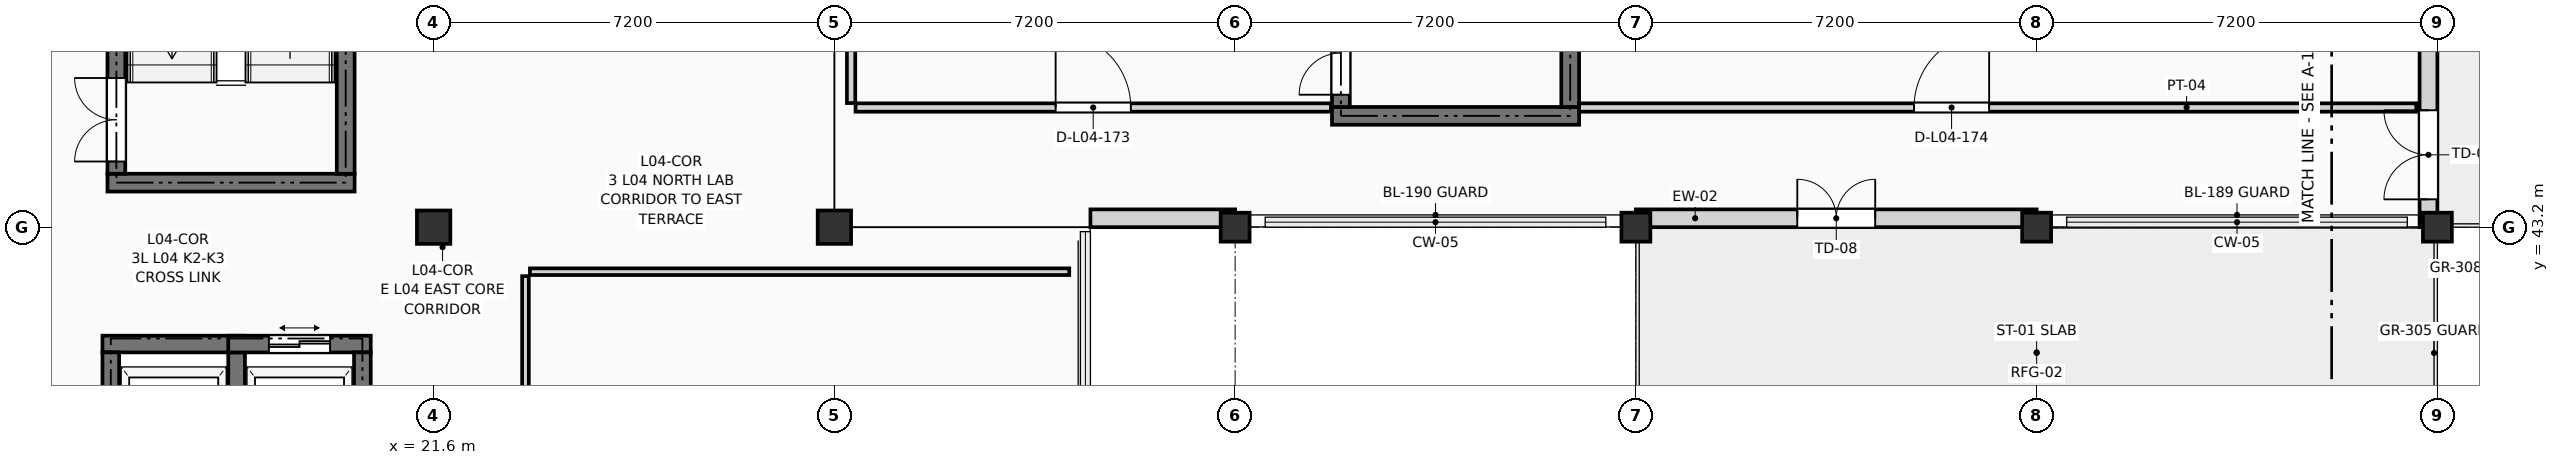
"""IFC4 building model, lengths in metres.
Left out: names, types, materials, properties, quantities, classifications, styles, units other than length and angle.
Written with IfcOpenShell. Run it as: python <this file> out.ifc"""

import sys

from ifc_helpers import new_model, si_unit, direction, frame, frame_2d, origin, origin_2d, place, context, subcontext, project, spatial, rectangle, extrude, element, fill, save


model = new_model("IFC4")
c1 = context("Model", 3, precision=1e-05, world=origin(), true_north=direction((0.0, 1.0)))
c2 = subcontext(c1, "Body", "Model", "MODEL_VIEW")
j1 = project(units=[si_unit("LENGTHUNIT", "METRE"), si_unit("PLANEANGLEUNIT", "RADIAN")], contexts=[c1])
p1 = place(None, origin())
s1 = spatial("IfcSite", under=j1, at=p1, CompositionType="ELEMENT")
p2 = place(p1, origin())
s2 = spatial("IfcBuilding", under=s1, at=p2, CompositionType="ELEMENT")
p3 = place(p2, frame((0.0, 0.0, 15.75)))
s3 = spatial("IfcBuildingStorey", under=s2, at=p3, CompositionType="ELEMENT", Elevation=15.75)
for number, where, z_axis, x_axis in (
    (1, (21.6, 43.2, 0.0), (0.0, 0.0, 1.0), (1.0, 0.0, 0.0)),
    (2, (28.8, 43.2, 0.0), (0.0, 0.0, 1.0), (1.0, 0.0, 0.0)),
):
    element("IfcColumn", number, at=place(p3, frame(where, z_axis=z_axis, x_axis=x_axis)), inside=s3, PredefinedType="COLUMN", context=c2, shape_type="SweptSolid", body=[
        extrude(rectangle(XDim=0.6, YDim=0.6, at=origin_2d()), origin(), (0.0, 0.0, 1.0), 3.6),
    ])
for number, where, z_axis, x_axis in (
    (3, (36.0, 43.2, 0.0), (0.0, 0.0, 1.0), (1.0, 0.0, 0.0)),
    (4, (43.2, 43.2, 0.0), (0.0, 0.0, 1.0), (1.0, 0.0, 0.0)),
    (5, (50.4, 43.2, 0.0), (0.0, 0.0, 1.0), (1.0, 0.0, 0.0)),
    (6, (57.6, 43.2, 0.0), (0.0, 0.0, 1.0), (1.0, 0.0, 0.0)),
):
    element("IfcColumn", number, at=place(p3, frame(where, z_axis=z_axis, x_axis=x_axis)), inside=s3, PredefinedType="COLUMN", context=c2, shape_type="SweptSolid", body=[
        extrude(rectangle(XDim=0.52, YDim=0.52, at=origin_2d()), origin(), (0.0, 0.0, 1.0), 3.6),
    ])
p4 = place(p3, frame((57.44, 43.2, 0.0), z_axis=(0.0, 0.0, 1.0), x_axis=(0.0, 1.0, 0.0)))
e7 = element("IfcWall", 7, at=p4, inside=s3, PredefinedType="SOLIDWALL", context=c2, shape_type="SweptSolid", body=[
    extrude(rectangle(XDim=6.0, YDim=0.32, at=frame_2d((3.0, 0.0))), origin(), (0.0, 0.0, 1.0), 2.84),
])
p5 = place(p4, frame((0.5, 0.0, 0.0)))
e8 = element("IfcOpeningElement", 8, at=p5, cuts=e7, PredefinedType="OPENING", context=c2, shape_type="SweptSolid", body=[
    extrude(rectangle(XDim=1.6, YDim=2.25, at=frame_2d((0.8, 1.125))), frame((0.0, 0.172, 0.0), z_axis=(0.0, -1.0, 0.0), x_axis=(1.0, 0.0, 0.0)), (0.0, 0.0, 1.0), 0.344),
])
p6 = place(p3, frame((43.2, 43.36, 0.0), z_axis=(0.0, 0.0, 1.0), x_axis=(1.0, 0.0, 0.0)))
e9 = element("IfcWall", 9, at=p6, inside=s3, PredefinedType="SOLIDWALL", context=c2, shape_type="SweptSolid", body=[
    extrude(rectangle(XDim=7.2, YDim=0.32, at=frame_2d((3.6, 0.0))), origin(), (0.0, 0.0, 1.0), 2.84),
])
p7 = place(p6, frame((2.9, 0.0, 0.0)))
e10 = element("IfcOpeningElement", 10, at=p7, cuts=e9, PredefinedType="OPENING", context=c2, shape_type="SweptSolid", body=[
    extrude(rectangle(XDim=1.4, YDim=2.2, at=frame_2d((0.7, 1.1))), frame((0.0, 0.172, 0.0), z_axis=(0.0, -1.0, 0.0), x_axis=(1.0, 0.0, 0.0)), (0.0, 0.0, 1.0), 0.344),
])
p8 = place(p3, frame((33.4, 43.36, 0.0), z_axis=(0.0, 0.0, 1.0), x_axis=(1.0, 0.0, 0.0)))
e11 = element("IfcWall", 11, at=p8, inside=s3, PredefinedType="SOLIDWALL", context=c2, shape_type="SweptSolid", body=[
    extrude(rectangle(XDim=2.6, YDim=0.32, at=frame_2d((1.3, 0.0))), origin(), (0.0, 0.0, 1.0), 3.38),
])
p9 = place(p3, frame((15.74, 44.0, 0.0), z_axis=(0.0, 0.0, 1.0), x_axis=(1.0, 0.0, 0.0)))
e12 = element("IfcWall", 12, at=p9, inside=s3, PredefinedType="SHEAR", context=c2, shape_type="SweptSolid", body=[
    extrude(rectangle(XDim=4.44, YDim=0.32, at=frame_2d((2.22, 0.0))), origin(), (0.0, 0.0, 1.0), 3.39),
])
p10 = place(p3, frame((15.9, 44.16, 0.0), z_axis=(0.0, 0.0, 1.0), x_axis=(0.0, 1.0, 0.0)))
e13 = element("IfcWall", 13, at=p10, inside=s3, PredefinedType="SHEAR", context=c2, shape_type="SweptSolid", body=[
    extrude(rectangle(XDim=7.28, YDim=0.32, at=frame_2d((3.64, 0.0))), origin(), (0.0, 0.0, 1.0), 3.39),
])
p11 = place(p10, frame((0.22, 0.0, 0.0)))
e14 = element("IfcOpeningElement", 14, at=p11, cuts=e13, PredefinedType="OPENING", context=c2, shape_type="SweptSolid", body=[
    extrude(rectangle(XDim=1.5, YDim=2.2, at=frame_2d((0.75, 1.1))), frame((0.0, 0.172, 0.0), z_axis=(0.0, -1.0, 0.0), x_axis=(1.0, 0.0, 0.0)), (0.0, 0.0, 1.0), 0.344),
])
p12 = place(p3, frame((20.02, 44.16, 0.0), z_axis=(0.0, 0.0, 1.0), x_axis=(0.0, 1.0, 0.0)))
e15 = element("IfcWall", 15, at=p12, inside=s3, PredefinedType="SHEAR", context=c2, shape_type="SweptSolid", body=[
    extrude(rectangle(XDim=7.28, YDim=0.32, at=frame_2d((3.64, 0.0))), origin(), (0.0, 0.0, 1.0), 3.39),
])
p13 = place(p3, frame((37.74, 45.2, 0.0), z_axis=(0.0, 0.0, 1.0), x_axis=(1.0, 0.0, 0.0)))
e16 = element("IfcWall", 16, at=p13, inside=s3, PredefinedType="SHEAR", context=c2, shape_type="SweptSolid", body=[
    extrude(rectangle(XDim=4.44, YDim=0.32, at=frame_2d((2.22, 0.0))), origin(), (0.0, 0.0, 1.0), 3.39),
])
p14 = place(p3, frame((37.9, 45.36, 0.0), z_axis=(0.0, 0.0, 1.0), x_axis=(0.0, 1.0, 0.0)))
e17 = element("IfcWall", 17, at=p14, inside=s3, PredefinedType="SHEAR", context=c2, shape_type="SweptSolid", body=[
    extrude(rectangle(XDim=7.28, YDim=0.32, at=frame_2d((3.64, 0.0))), origin(), (0.0, 0.0, 1.0), 3.39),
])
p15 = place(p14, frame((0.22, 0.0, 0.0)))
e18 = element("IfcOpeningElement", 18, at=p15, cuts=e17, PredefinedType="OPENING", context=c2, shape_type="SweptSolid", body=[
    extrude(rectangle(XDim=1.5, YDim=2.2, at=frame_2d((0.75, 1.1))), frame((0.0, 0.172, 0.0), z_axis=(0.0, -1.0, 0.0), x_axis=(1.0, 0.0, 0.0)), (0.0, 0.0, 1.0), 0.344),
])
p16 = place(p3, frame((42.02, 45.36, 0.0), z_axis=(0.0, 0.0, 1.0), x_axis=(0.0, 1.0, 0.0)))
e19 = element("IfcWall", 19, at=p16, inside=s3, PredefinedType="SHEAR", context=c2, shape_type="SweptSolid", body=[
    extrude(rectangle(XDim=7.28, YDim=0.32, at=frame_2d((3.64, 0.0))), origin(), (0.0, 0.0, 1.0), 3.39),
])
p17 = place(p3, frame((15.65, 41.1, 0.0), z_axis=(0.0, 0.0, 1.0), x_axis=(1.0, 0.0, 0.0)))
e20 = element("IfcWall", 20, at=p17, inside=s3, PredefinedType="SHEAR", context=c2, shape_type="SweptSolid", body=[
    extrude(rectangle(XDim=2.56, YDim=0.3, at=frame_2d((1.28, 0.0))), origin(), (0.0, 0.0, 1.0), 3.39),
])
p18 = place(p3, frame((15.8, 37.98, 0.0), z_axis=(0.0, 0.0, 1.0), x_axis=(0.0, 1.0, 0.0)))
e21 = element("IfcWall", 21, at=p18, inside=s3, PredefinedType="SHEAR", context=c2, shape_type="SweptSolid", body=[
    extrude(rectangle(XDim=2.97, YDim=0.3, at=frame_2d((1.485, 0.0))), origin(), (0.0, 0.0, 1.0), 3.39),
])
p19 = place(p18, frame((0.935, 0.0, 0.0)))
e22 = element("IfcOpeningElement", 22, at=p19, cuts=e21, PredefinedType="OPENING", context=c2, shape_type="SweptSolid", body=[
    extrude(rectangle(XDim=1.1, YDim=2.2, at=frame_2d((0.55, 1.1))), frame((0.0, 0.162, 0.0), z_axis=(0.0, -1.0, 0.0), x_axis=(1.0, 0.0, 0.0)), (0.0, 0.0, 1.0), 0.324),
])
p20 = place(p3, frame((18.06, 37.98, 0.0), z_axis=(0.0, 0.0, 1.0), x_axis=(0.0, 1.0, 0.0)))
e23 = element("IfcWall", 23, at=p20, inside=s3, PredefinedType="SHEAR", context=c2, shape_type="SweptSolid", body=[
    extrude(rectangle(XDim=2.97, YDim=0.3, at=frame_2d((1.485, 0.0))), origin(), (0.0, 0.0, 1.0), 3.39),
])
p21 = place(p3, frame((17.91, 41.1, 0.0), z_axis=(0.0, 0.0, 1.0), x_axis=(1.0, 0.0, 0.0)))
e24 = element("IfcWall", 24, at=p21, inside=s3, PredefinedType="SHEAR", context=c2, shape_type="SweptSolid", body=[
    extrude(rectangle(XDim=2.56, YDim=0.3, at=frame_2d((1.28, 0.0))), origin(), (0.0, 0.0, 1.0), 3.39),
])
p22 = place(p21, frame((0.73, 0.0, 0.0)))
e25 = element("IfcOpeningElement", 25, at=p22, cuts=e24, PredefinedType="OPENING", context=c2, shape_type="SweptSolid", body=[
    extrude(rectangle(XDim=1.1, YDim=2.2, at=frame_2d((0.55, 1.1))), frame((0.0, 0.162, 0.0), z_axis=(0.0, -1.0, 0.0), x_axis=(1.0, 0.0, 0.0)), (0.0, 0.0, 1.0), 0.324),
])
p23 = place(p3, frame((20.32, 37.98, 0.0), z_axis=(0.0, 0.0, 1.0), x_axis=(0.0, 1.0, 0.0)))
e26 = element("IfcWall", 26, at=p23, inside=s3, PredefinedType="SHEAR", context=c2, shape_type="SweptSolid", body=[
    extrude(rectangle(XDim=2.97, YDim=0.3, at=frame_2d((1.485, 0.0))), origin(), (0.0, 0.0, 1.0), 3.39),
])
p24 = place(p3, frame((23.25, 31.68, 0.0), z_axis=(0.0, 0.0, 1.0), x_axis=(0.0, 1.0, 0.0)))
e27 = element("IfcWall", 27, at=p24, inside=s3, PredefinedType="PARTITIONING", context=c2, shape_type="SweptSolid", body=[
    extrude(rectangle(XDim=10.64, YDim=0.12, at=frame_2d((5.32, 0.0))), origin(), (0.0, 0.0, 1.0), 3.375),
])
p25 = place(p24, frame((5.77, 0.0, 0.0)))
e28 = element("IfcOpeningElement", 28, at=p25, cuts=e27, PredefinedType="OPENING", context=c2, shape_type="SweptSolid", body=[
    extrude(rectangle(XDim=1.32, YDim=2.2, at=frame_2d((0.66, 1.1))), frame((0.0, 0.072, 0.0), z_axis=(0.0, -1.0, 0.0), x_axis=(1.0, 0.0, 0.0)), (0.0, 0.0, 1.0), 0.144),
])
p26 = place(p3, frame((23.33, 42.4, 0.0), z_axis=(0.0, 0.0, 1.0), x_axis=(1.0, 0.0, 0.0)))
e29 = element("IfcWall", 29, at=p26, inside=s3, PredefinedType="PARTITIONING", context=c2, shape_type="SweptSolid", body=[
    extrude(rectangle(XDim=9.69, YDim=0.12, at=frame_2d((4.845, 0.0))), origin(), (0.0, 0.0, 1.0), 3.375),
])
p27 = place(p3, frame((29.1, 45.43, 0.0), z_axis=(0.0, 0.0, 1.0), x_axis=(0.0, 1.0, 0.0)))
e30 = element("IfcWall", 30, at=p27, inside=s3, PredefinedType="PARTITIONING", context=c2, shape_type="SweptSolid", body=[
    extrude(rectangle(XDim=10.49, YDim=0.15, at=frame_2d((5.245, 0.0))), origin(), (0.0, 0.0, 1.0), 2.655),
])
p28 = place(p3, frame((29.18, 45.35, 0.0), z_axis=(0.0, 0.0, 1.0), x_axis=(1.0, 0.0, 0.0)))
e31 = element("IfcWall", 31, at=p28, inside=s3, PredefinedType="PARTITIONING", context=c2, shape_type="SweptSolid", body=[
    extrude(rectangle(XDim=8.54, YDim=0.15, at=frame_2d((4.27, 0.0))), origin(), (0.0, 0.0, 1.0), 3.375),
])
p29 = place(p28, frame((3.595, 0.0, 0.0)))
e32 = element("IfcOpeningElement", 32, at=p29, cuts=e31, PredefinedType="OPENING", context=c2, shape_type="SweptSolid", body=[
    extrude(rectangle(XDim=1.35, YDim=2.2, at=frame_2d((0.675, 1.1))), frame((0.0, 0.087, 0.0), z_axis=(0.0, -1.0, 0.0), x_axis=(1.0, 0.0, 0.0)), (0.0, 0.0, 1.0), 0.174),
])
p30 = place(p3, frame((42.18, 45.35, 0.0), z_axis=(0.0, 0.0, 1.0), x_axis=(1.0, 0.0, 0.0)))
e33 = element("IfcWall", 33, at=p30, inside=s3, PredefinedType="PARTITIONING", context=c2, shape_type="SweptSolid", body=[
    extrude(rectangle(XDim=15.04, YDim=0.15, at=frame_2d((7.52, 0.0))), origin(), (0.0, 0.0, 1.0), 3.375),
])
p31 = place(p30, frame((6.017, 0.0, 0.0)))
e34 = element("IfcOpeningElement", 34, at=p31, cuts=e33, PredefinedType="OPENING", context=c2, shape_type="SweptSolid", body=[
    extrude(rectangle(XDim=1.35, YDim=2.2, at=frame_2d((0.675, 1.1))), frame((0.0, 0.087, 0.0), z_axis=(0.0, -1.0, 0.0), x_axis=(1.0, 0.0, 0.0)), (0.0, 0.0, 1.0), 0.174),
])
p32 = place(p5, origin())
e35 = element("IfcDoor", 35, at=p32, inside=s3, OperationType="DOUBLE_DOOR_SINGLE_SWING", PredefinedType="DOOR", context=c2, shape_type="SweptSolid", body=[
    extrude(rectangle(XDim=1.6, YDim=2.25, at=frame_2d((0.8, 1.125))), frame((0.0, 0.025, 0.0), z_axis=(0.0, -1.0, 0.0), x_axis=(1.0, 0.0, 0.0)), (0.0, 0.0, 1.0), 0.05),
])
fill(e8, e35)
p33 = place(p7, origin())
e36 = element("IfcDoor", 36, at=p33, inside=s3, OperationType="DOUBLE_DOOR_SINGLE_SWING", PredefinedType="DOOR", context=c2, shape_type="SweptSolid", body=[
    extrude(rectangle(XDim=1.4, YDim=2.2, at=frame_2d((0.7, 1.1))), frame((0.0, 0.025, 0.0), z_axis=(0.0, -1.0, 0.0), x_axis=(1.0, 0.0, 0.0)), (0.0, 0.0, 1.0), 0.05),
])
fill(e10, e36)
p34 = place(p11, origin())
e37 = element("IfcDoor", 37, at=p34, inside=s3, OperationType="DOUBLE_DOOR_SINGLE_SWING", PredefinedType="DOOR", context=c2, shape_type="SweptSolid", body=[
    extrude(rectangle(XDim=1.5, YDim=2.2, at=frame_2d((0.75, 1.1))), frame((0.0, 0.025, 0.0), z_axis=(0.0, -1.0, 0.0), x_axis=(1.0, 0.0, 0.0)), (0.0, 0.0, 1.0), 0.05),
])
fill(e14, e37)
p35 = place(p15, origin())
e38 = element("IfcDoor", 38, at=p35, inside=s3, OperationType="DOUBLE_DOOR_SINGLE_SWING", PredefinedType="DOOR", context=c2, shape_type="SweptSolid", body=[
    extrude(rectangle(XDim=1.5, YDim=2.2, at=frame_2d((0.75, 1.1))), frame((0.0, 0.025, 0.0), z_axis=(0.0, -1.0, 0.0), x_axis=(1.0, 0.0, 0.0)), (0.0, 0.0, 1.0), 0.05),
])
fill(e18, e38)
p36 = place(p22, origin())
e39 = element("IfcDoor", 39, at=p36, inside=s3, OperationType="DOUBLE_DOOR_SLIDING", PredefinedType="DOOR", context=c2, shape_type="SweptSolid", body=[
    extrude(rectangle(XDim=1.1, YDim=2.2, at=frame_2d((0.55, 1.1))), frame((0.0, 0.025, 0.0), z_axis=(0.0, -1.0, 0.0), x_axis=(1.0, 0.0, 0.0)), (0.0, 0.0, 1.0), 0.05),
])
fill(e25, e39)
p37 = place(p29, origin())
e40 = element("IfcDoor", 40, at=p37, inside=s3, OperationType="SINGLE_SWING_LEFT", PredefinedType="DOOR", context=c2, shape_type="SweptSolid", body=[
    extrude(rectangle(XDim=1.35, YDim=2.2, at=frame_2d((0.675, 1.1))), frame((0.0, 0.025, 0.0), z_axis=(0.0, -1.0, 0.0), x_axis=(1.0, 0.0, 0.0)), (0.0, 0.0, 1.0), 0.05),
])
fill(e32, e40)
p38 = place(p31, origin())
e41 = element("IfcDoor", 41, at=p38, inside=s3, OperationType="SINGLE_SWING_RIGHT", PredefinedType="DOOR", context=c2, shape_type="SweptSolid", body=[
    extrude(rectangle(XDim=1.35, YDim=2.2, at=frame_2d((0.675, 1.1))), frame((0.0, 0.025, 0.0), z_axis=(0.0, -1.0, 0.0), x_axis=(1.0, 0.0, 0.0)), (0.0, 0.0, 1.0), 0.05),
])
fill(e34, e41)
save(model, sys.argv[1])
